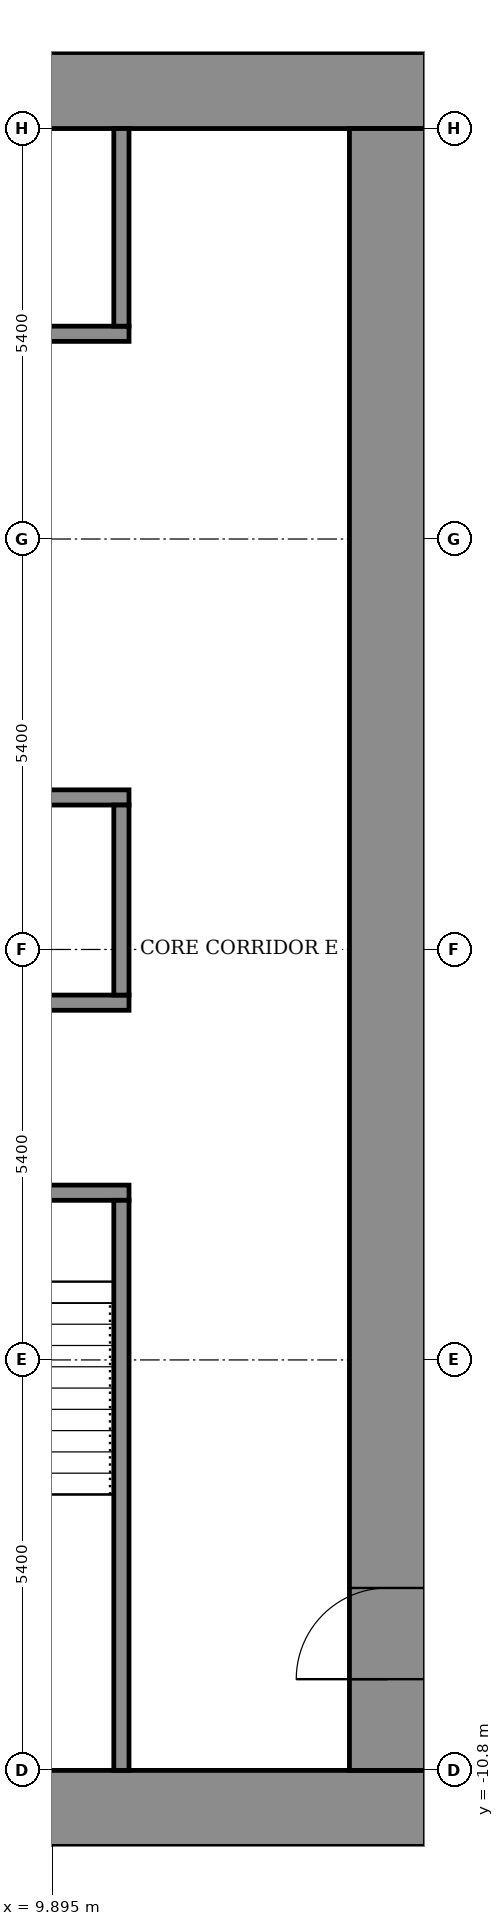
"""IFC4 building model, lengths in metres.
Left out: names, types, materials, properties, quantities, classifications, styles, units other than length and angle.
Written with IfcOpenShell. Run it as: python <this file> out.ifc"""

import sys

from ifc_helpers import new_model, si_unit, direction, frame, frame_2d, origin, place, context, subcontext, project, spatial, rectangle, extrude, element, fill, save


model = new_model("IFC4")
c1 = context("Model", 3, precision=1e-05, world=origin(), true_north=direction((0.0, 1.0)))
c2 = subcontext(c1, "Body", "Model", "MODEL_VIEW")
j1 = project(units=[si_unit("LENGTHUNIT", "METRE"), si_unit("PLANEANGLEUNIT", "RADIAN")], contexts=[c1])
p1 = place(None, origin())
s1 = spatial("IfcSite", under=j1, at=p1, CompositionType="ELEMENT")
p2 = place(p1, origin())
s2 = spatial("IfcBuilding", under=s1, at=p2, CompositionType="ELEMENT")
p3 = place(p2, frame((0.0, 0.0, 93.7)))
s3 = spatial("IfcBuildingStorey", under=s2, at=p3, CompositionType="ELEMENT", Elevation=93.7)
for number, where, z_axis, x_axis in (
    (1, (-14.8, -11.3, 0.0), (0.0, 0.0, 1.0), (1.0, 0.0, 0.0)),
    (2, (-14.8, 11.3, 0.0), (0.0, 0.0, 1.0), (1.0, 0.0, 0.0)),
):
    element("IfcWall", number, at=place(p3, frame(where, z_axis=z_axis, x_axis=x_axis)), inside=s3, PredefinedType="SHEAR", context=c2, shape_type="SweptSolid", body=[
        extrude(rectangle(XDim=29.6, YDim=1.0, at=frame_2d((14.8, 0.0))), origin(), (0.0, 0.0, 1.0), 3.6),
    ])
p4 = place(p3, frame((14.3, -10.8, 0.0), z_axis=(0.0, 0.0, 1.0), x_axis=(0.0, 1.0, 0.0)))
e3 = element("IfcWall", 3, at=p4, inside=s3, PredefinedType="SHEAR", context=c2, shape_type="SweptSolid", body=[
    extrude(rectangle(XDim=21.6, YDim=1.0, at=frame_2d((10.8, 0.0))), origin(), (0.0, 0.0, 1.0), 3.6),
])
p5 = place(p4, frame((1.2, 0.0, 0.0)))
e4 = element("IfcOpeningElement", 4, at=p5, cuts=e3, PredefinedType="OPENING", context=c2, shape_type="SweptSolid", body=[
    extrude(rectangle(XDim=1.2, YDim=2.1, at=frame_2d((0.6, 1.05))), frame((0.0, 0.51, 0.0), z_axis=(0.0, -1.0, 0.0), x_axis=(1.0, 0.0, 0.0)), (0.0, 0.0, 1.0), 1.02),
])
p6 = place(p3, frame((-10.9, -3.2, 0.0), z_axis=(0.0, 0.0, 1.0), x_axis=(1.0, 0.0, 0.0)))
e5 = element("IfcWall", 5, at=p6, inside=s3, PredefinedType="SHEAR", context=c2, shape_type="SweptSolid", body=[
    extrude(rectangle(XDim=21.8, YDim=0.2, at=frame_2d((10.9, 0.0))), origin(), (0.0, 0.0, 1.0), 3.05),
])
p7 = place(p6, frame((1.075, 0.0, 0.0)))
e6 = element("IfcOpeningElement", 6, at=p7, cuts=e5, PredefinedType="OPENING", context=c2, shape_type="SweptSolid", body=[
    extrude(rectangle(XDim=1.1, YDim=2.1, at=frame_2d((0.55, 1.05))), frame((0.0, 0.11, 0.0), z_axis=(0.0, -1.0, 0.0), x_axis=(1.0, 0.0, 0.0)), (0.0, 0.0, 1.0), 0.22),
])
p8 = place(p6, frame((10.325, 0.0, 0.0)))
e7 = element("IfcOpeningElement", 7, at=p8, cuts=e5, PredefinedType="OPENING", context=c2, shape_type="SweptSolid", body=[
    extrude(rectangle(XDim=1.1, YDim=2.1, at=frame_2d((0.55, 1.05))), frame((0.0, 0.11, 0.0), z_axis=(0.0, -1.0, 0.0), x_axis=(1.0, 0.0, 0.0)), (0.0, 0.0, 1.0), 0.22),
])
p9 = place(p6, frame((19.625, 0.0, 0.0)))
e8 = element("IfcOpeningElement", 8, at=p9, cuts=e5, PredefinedType="OPENING", context=c2, shape_type="SweptSolid", body=[
    extrude(rectangle(XDim=1.1, YDim=2.1, at=frame_2d((0.55, 1.05))), frame((0.0, 0.11, 0.0), z_axis=(0.0, -1.0, 0.0), x_axis=(1.0, 0.0, 0.0)), (0.0, 0.0, 1.0), 0.22),
])
p10 = place(p6, frame((5.7, 0.0, 0.0)))
e9 = element("IfcOpeningElement", 9, at=p10, cuts=e5, PredefinedType="OPENING", context=c2, shape_type="SweptSolid", body=[
    extrude(rectangle(XDim=1.1, YDim=2.1, at=frame_2d((0.55, 1.05))), frame((0.0, 0.11, 0.0), z_axis=(0.0, -1.0, 0.0), x_axis=(1.0, 0.0, 0.0)), (0.0, 0.0, 1.0), 0.22),
])
p11 = place(p6, frame((14.975, 0.0, 0.0)))
e10 = element("IfcOpeningElement", 10, at=p11, cuts=e5, PredefinedType="OPENING", context=c2, shape_type="SweptSolid", body=[
    extrude(rectangle(XDim=1.1, YDim=2.1, at=frame_2d((0.55, 1.05))), frame((0.0, 0.11, 0.0), z_axis=(0.0, -1.0, 0.0), x_axis=(1.0, 0.0, 0.0)), (0.0, 0.0, 1.0), 0.22),
])
p12 = place(p3, frame((-10.9, -0.7, 0.0), z_axis=(0.0, 0.0, 1.0), x_axis=(1.0, 0.0, 0.0)))
e11 = element("IfcWall", 11, at=p12, inside=s3, PredefinedType="SHEAR", context=c2, shape_type="SweptSolid", body=[
    extrude(rectangle(XDim=21.8, YDim=0.2, at=frame_2d((10.9, 0.0))), origin(), (0.0, 0.0, 1.0), 3.05),
])
p13 = place(p3, frame((-10.9, 2.0, 0.0), z_axis=(0.0, 0.0, 1.0), x_axis=(1.0, 0.0, 0.0)))
e12 = element("IfcWall", 12, at=p13, inside=s3, PredefinedType="SHEAR", context=c2, shape_type="SweptSolid", body=[
    extrude(rectangle(XDim=21.8, YDim=0.2, at=frame_2d((10.9, 0.0))), origin(), (0.0, 0.0, 1.0), 3.05),
])
p14 = place(p13, frame((0.9, 0.0, 0.0)))
e13 = element("IfcOpeningElement", 13, at=p14, cuts=e12, PredefinedType="OPENING", context=c2, shape_type="SweptSolid", body=[
    extrude(rectangle(XDim=1.1, YDim=2.1, at=frame_2d((0.55, 1.05))), frame((0.0, 0.11, 0.0), z_axis=(0.0, -1.0, 0.0), x_axis=(1.0, 0.0, 0.0)), (0.0, 0.0, 1.0), 0.22),
])
p15 = place(p13, frame((3.6, 0.0, 0.0)))
e14 = element("IfcOpeningElement", 14, at=p15, cuts=e12, PredefinedType="OPENING", context=c2, shape_type="SweptSolid", body=[
    extrude(rectangle(XDim=1.1, YDim=2.1, at=frame_2d((0.55, 1.05))), frame((0.0, 0.11, 0.0), z_axis=(0.0, -1.0, 0.0), x_axis=(1.0, 0.0, 0.0)), (0.0, 0.0, 1.0), 0.22),
])
p16 = place(p13, frame((6.3, 0.0, 0.0)))
e15 = element("IfcOpeningElement", 15, at=p16, cuts=e12, PredefinedType="OPENING", context=c2, shape_type="SweptSolid", body=[
    extrude(rectangle(XDim=1.1, YDim=2.1, at=frame_2d((0.55, 1.05))), frame((0.0, 0.11, 0.0), z_axis=(0.0, -1.0, 0.0), x_axis=(1.0, 0.0, 0.0)), (0.0, 0.0, 1.0), 0.22),
])
p17 = place(p13, frame((9.0, 0.0, 0.0)))
e16 = element("IfcOpeningElement", 16, at=p17, cuts=e12, PredefinedType="OPENING", context=c2, shape_type="SweptSolid", body=[
    extrude(rectangle(XDim=1.1, YDim=2.1, at=frame_2d((0.55, 1.05))), frame((0.0, 0.11, 0.0), z_axis=(0.0, -1.0, 0.0), x_axis=(1.0, 0.0, 0.0)), (0.0, 0.0, 1.0), 0.22),
])
p18 = place(p13, frame((11.7, 0.0, 0.0)))
e17 = element("IfcOpeningElement", 17, at=p18, cuts=e12, PredefinedType="OPENING", context=c2, shape_type="SweptSolid", body=[
    extrude(rectangle(XDim=1.1, YDim=2.1, at=frame_2d((0.55, 1.05))), frame((0.0, 0.11, 0.0), z_axis=(0.0, -1.0, 0.0), x_axis=(1.0, 0.0, 0.0)), (0.0, 0.0, 1.0), 0.22),
])
p19 = place(p13, frame((15.175, 0.0, 0.0)))
e18 = element("IfcOpeningElement", 18, at=p19, cuts=e12, PredefinedType="OPENING", context=c2, shape_type="SweptSolid", body=[
    extrude(rectangle(XDim=0.9, YDim=2.1, at=frame_2d((0.45, 1.05))), frame((0.0, 0.11, 0.0), z_axis=(0.0, -1.0, 0.0), x_axis=(1.0, 0.0, 0.0)), (0.0, 0.0, 1.0), 0.22),
])
p20 = place(p13, frame((19.225, 0.0, 0.0)))
e19 = element("IfcOpeningElement", 19, at=p20, cuts=e12, PredefinedType="OPENING", context=c2, shape_type="SweptSolid", body=[
    extrude(rectangle(XDim=0.9, YDim=2.1, at=frame_2d((0.45, 1.05))), frame((0.0, 0.11, 0.0), z_axis=(0.0, -1.0, 0.0), x_axis=(1.0, 0.0, 0.0)), (0.0, 0.0, 1.0), 0.22),
])
p21 = place(p3, frame((-10.9, 8.1, 0.0), z_axis=(0.0, 0.0, 1.0), x_axis=(1.0, 0.0, 0.0)))
e20 = element("IfcWall", 20, at=p21, inside=s3, PredefinedType="SHEAR", context=c2, shape_type="SweptSolid", body=[
    extrude(rectangle(XDim=21.8, YDim=0.2, at=frame_2d((10.9, 0.0))), origin(), (0.0, 0.0, 1.0), 3.05),
])
p22 = place(p21, frame((0.9, 0.0, 0.0)))
e21 = element("IfcOpeningElement", 21, at=p22, cuts=e20, PredefinedType="OPENING", context=c2, shape_type="SweptSolid", body=[
    extrude(rectangle(XDim=1.1, YDim=2.1, at=frame_2d((0.55, 1.05))), frame((0.0, 0.11, 0.0), z_axis=(0.0, -1.0, 0.0), x_axis=(1.0, 0.0, 0.0)), (0.0, 0.0, 1.0), 0.22),
])
p23 = place(p21, frame((3.6, 0.0, 0.0)))
e22 = element("IfcOpeningElement", 22, at=p23, cuts=e20, PredefinedType="OPENING", context=c2, shape_type="SweptSolid", body=[
    extrude(rectangle(XDim=1.1, YDim=2.1, at=frame_2d((0.55, 1.05))), frame((0.0, 0.11, 0.0), z_axis=(0.0, -1.0, 0.0), x_axis=(1.0, 0.0, 0.0)), (0.0, 0.0, 1.0), 0.22),
])
p24 = place(p21, frame((6.3, 0.0, 0.0)))
e23 = element("IfcOpeningElement", 23, at=p24, cuts=e20, PredefinedType="OPENING", context=c2, shape_type="SweptSolid", body=[
    extrude(rectangle(XDim=1.1, YDim=2.1, at=frame_2d((0.55, 1.05))), frame((0.0, 0.11, 0.0), z_axis=(0.0, -1.0, 0.0), x_axis=(1.0, 0.0, 0.0)), (0.0, 0.0, 1.0), 0.22),
])
p25 = place(p21, frame((9.0, 0.0, 0.0)))
e24 = element("IfcOpeningElement", 24, at=p25, cuts=e20, PredefinedType="OPENING", context=c2, shape_type="SweptSolid", body=[
    extrude(rectangle(XDim=1.1, YDim=2.1, at=frame_2d((0.55, 1.05))), frame((0.0, 0.11, 0.0), z_axis=(0.0, -1.0, 0.0), x_axis=(1.0, 0.0, 0.0)), (0.0, 0.0, 1.0), 0.22),
])
p26 = place(p21, frame((11.7, 0.0, 0.0)))
e25 = element("IfcOpeningElement", 25, at=p26, cuts=e20, PredefinedType="OPENING", context=c2, shape_type="SweptSolid", body=[
    extrude(rectangle(XDim=1.1, YDim=2.1, at=frame_2d((0.55, 1.05))), frame((0.0, 0.11, 0.0), z_axis=(0.0, -1.0, 0.0), x_axis=(1.0, 0.0, 0.0)), (0.0, 0.0, 1.0), 0.22),
])
p27 = place(p21, frame((15.175, 0.0, 0.0)))
e26 = element("IfcOpeningElement", 26, at=p27, cuts=e20, PredefinedType="OPENING", context=c2, shape_type="SweptSolid", body=[
    extrude(rectangle(XDim=0.9, YDim=2.1, at=frame_2d((0.45, 1.05))), frame((0.0, 0.11, 0.0), z_axis=(0.0, -1.0, 0.0), x_axis=(1.0, 0.0, 0.0)), (0.0, 0.0, 1.0), 0.22),
])
p28 = place(p21, frame((19.225, 0.0, 0.0)))
e27 = element("IfcOpeningElement", 27, at=p28, cuts=e20, PredefinedType="OPENING", context=c2, shape_type="SweptSolid", body=[
    extrude(rectangle(XDim=0.9, YDim=2.1, at=frame_2d((0.45, 1.05))), frame((0.0, 0.11, 0.0), z_axis=(0.0, -1.0, 0.0), x_axis=(1.0, 0.0, 0.0)), (0.0, 0.0, 1.0), 0.22),
])
p29 = place(p3, frame((10.8, -10.8, 0.0), z_axis=(0.0, 0.0, 1.0), x_axis=(0.0, 1.0, 0.0)))
e28 = element("IfcWall", 28, at=p29, inside=s3, PredefinedType="SHEAR", context=c2, shape_type="SweptSolid", body=[
    extrude(rectangle(XDim=7.5, YDim=0.2, at=frame_2d((3.75, 0.0))), origin(), (0.0, 0.0, 1.0), 3.05),
])
p30 = place(p3, frame((10.8, -0.6, 0.0), z_axis=(0.0, 0.0, 1.0), x_axis=(0.0, 1.0, 0.0)))
e29 = element("IfcWall", 29, at=p30, inside=s3, PredefinedType="STANDARD", context=c2, shape_type="SweptSolid", body=[
    extrude(rectangle(XDim=2.5, YDim=0.2, at=frame_2d((1.25, 0.0))), origin(), (0.0, 0.0, 1.0), 3.05),
])
p31 = place(p3, frame((10.8, 8.2, 0.0), z_axis=(0.0, 0.0, 1.0), x_axis=(0.0, 1.0, 0.0)))
e30 = element("IfcWall", 30, at=p31, inside=s3, PredefinedType="STANDARD", context=c2, shape_type="SweptSolid", body=[
    extrude(rectangle(XDim=2.6, YDim=0.2, at=frame_2d((1.3, 0.0))), origin(), (0.0, 0.0, 1.0), 3.05),
])
p32 = place(p5, origin())
e31 = element("IfcDoor", 31, at=p32, inside=s3, OperationType="DOUBLE_DOOR_SINGLE_SWING", PredefinedType="DOOR", context=c2, shape_type="SweptSolid", body=[
    extrude(rectangle(XDim=1.2, YDim=2.1, at=frame_2d((0.6, 1.05))), frame((0.0, 0.025, 0.0), z_axis=(0.0, -1.0, 0.0), x_axis=(1.0, 0.0, 0.0)), (0.0, 0.0, 1.0), 0.05),
])
fill(e4, e31)
save(model, sys.argv[1])
